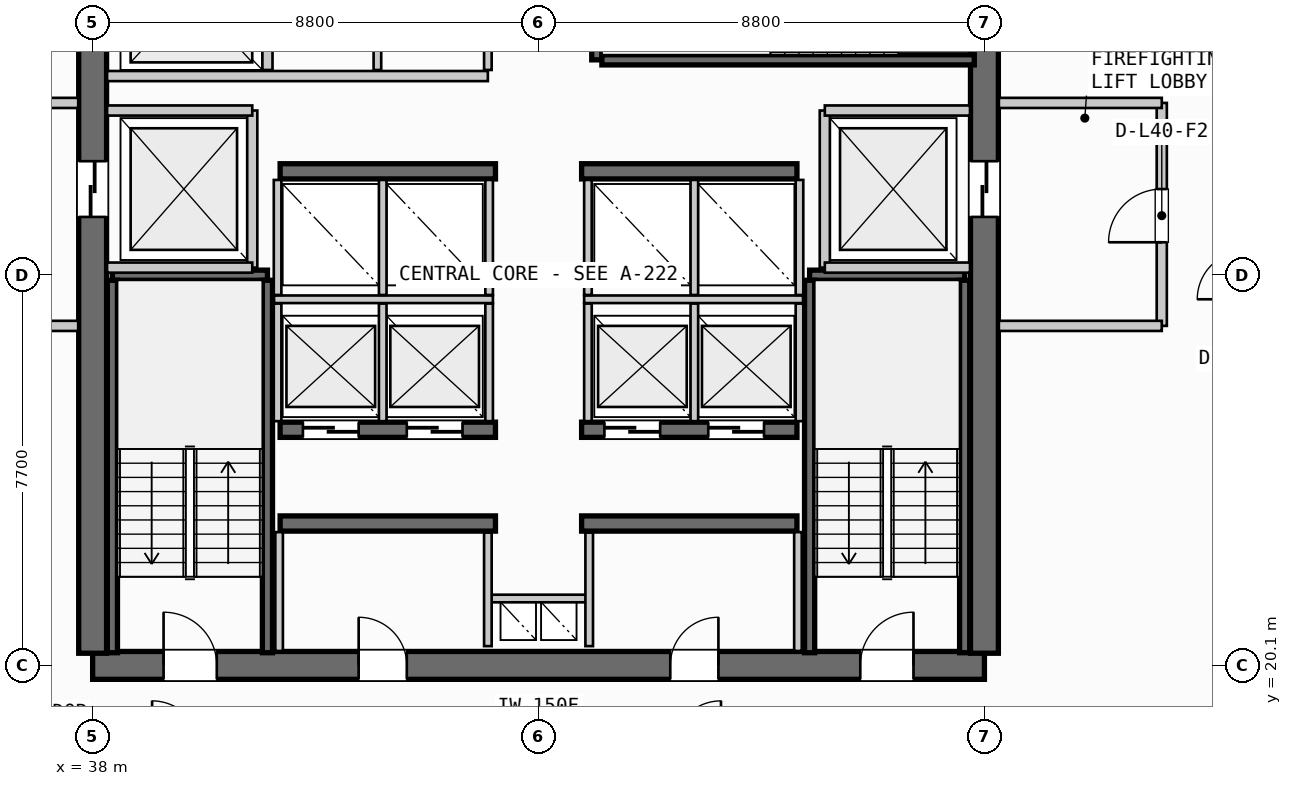
"""IFC4 building model, lengths in metres.
Left out: names, types, materials, properties, quantities, classifications, styles, units other than length and angle.
Written with IfcOpenShell. Run it as: python <this file> out.ifc"""

import sys

from ifc_helpers import new_model, si_unit, direction, frame, frame_2d, origin, place, context, subcontext, project, spatial, rectangle, extrude, source, transform, mapped, element, fill, save


model = new_model("IFC4")
c1 = context("Model", 3, precision=1e-05, world=origin(), true_north=direction((0.0, 1.0)))
c2 = subcontext(c1, "Body", "Model", "MODEL_VIEW")
j1 = project(units=[si_unit("LENGTHUNIT", "METRE"), si_unit("PLANEANGLEUNIT", "RADIAN")], contexts=[c1])
p1 = place(None, origin())
s1 = spatial("IfcSite", under=j1, at=p1, CompositionType="ELEMENT")
p2 = place(p1, origin())
s2 = spatial("IfcBuilding", under=s1, at=p2, CompositionType="ELEMENT")
p3 = place(p2, frame((0.0, 0.0, 157.2)))
s3 = spatial("IfcBuildingStorey", under=s2, at=p3, CompositionType="ELEMENT", Elevation=157.2)
p4 = place(p3, frame((38.0, 20.1, 0.0), z_axis=(0.0, 0.0, 1.0), x_axis=(1.0, 0.0, 0.0)))
e1 = element("IfcWall", 1, at=p4, inside=s3, PredefinedType="SHEAR", context=c2, shape_type="SweptSolid", body=[
    extrude(rectangle(XDim=17.6, YDim=0.55, at=frame_2d((8.8, 0.0))), origin(), (0.0, 0.0, 1.0), 3.3),
])
p5 = place(p4, frame((1.4, 0.0, 0.0)))
e2 = element("IfcOpeningElement", 2, at=p5, cuts=e1, PredefinedType="OPENING", context=c2, shape_type="SweptSolid", body=[
    extrude(rectangle(XDim=1.05, YDim=2.15, at=frame_2d((0.525, 1.075))), frame((0.0, 0.285, 0.0), z_axis=(0.0, -1.0, 0.0), x_axis=(1.0, 0.0, 0.0)), (0.0, 0.0, 1.0), 0.57),
])
p6 = place(p4, frame((15.15, 0.0, 0.0)))
e3 = element("IfcOpeningElement", 3, at=p6, cuts=e1, PredefinedType="OPENING", context=c2, shape_type="SweptSolid", body=[
    extrude(rectangle(XDim=1.05, YDim=2.15, at=frame_2d((0.525, 1.075))), frame((0.0, 0.285, 0.0), z_axis=(0.0, -1.0, 0.0), x_axis=(1.0, 0.0, 0.0)), (0.0, 0.0, 1.0), 0.57),
])
p7 = place(p4, frame((5.25, 0.0, 0.0)))
e4 = element("IfcOpeningElement", 4, at=p7, cuts=e1, PredefinedType="OPENING", context=c2, shape_type="SweptSolid", body=[
    extrude(rectangle(XDim=0.95, YDim=2.15, at=frame_2d((0.475, 1.075))), frame((0.0, 0.285, 0.0), z_axis=(0.0, -1.0, 0.0), x_axis=(1.0, 0.0, 0.0)), (0.0, 0.0, 1.0), 0.57),
])
p8 = place(p4, frame((11.4, 0.0, 0.0)))
e5 = element("IfcOpeningElement", 5, at=p8, cuts=e1, PredefinedType="OPENING", context=c2, shape_type="SweptSolid", body=[
    extrude(rectangle(XDim=0.95, YDim=2.15, at=frame_2d((0.475, 1.075))), frame((0.0, 0.285, 0.0), z_axis=(0.0, -1.0, 0.0), x_axis=(1.0, 0.0, 0.0)), (0.0, 0.0, 1.0), 0.57),
])
p9 = place(p3, frame((38.0, 35.26, 0.0), z_axis=(0.0, 0.0, 1.0), x_axis=(0.0, -1.0, 0.0)))
e6 = element("IfcWall", 6, at=p9, inside=s3, PredefinedType="SHEAR", context=c2, shape_type="SweptSolid", body=[
    extrude(rectangle(XDim=14.92, YDim=0.55, at=frame_2d((7.46, 0.0))), origin(), (0.0, 0.0, 1.0), 3.3),
])
p10 = place(p9, frame((5.21, 0.0, 0.0)))
e7 = element("IfcOpeningElement", 7, at=p10, cuts=e6, PredefinedType="OPENING", context=c2, shape_type="SweptSolid", body=[
    extrude(rectangle(XDim=1.1, YDim=2.2, at=frame_2d((0.55, 1.1))), frame((0.0, 0.285, 0.0), z_axis=(0.0, -1.0, 0.0), x_axis=(1.0, 0.0, 0.0)), (0.0, 0.0, 1.0), 0.57),
])
p11 = place(p3, frame((55.6, 20.34, 0.0), z_axis=(0.0, 0.0, 1.0), x_axis=(0.0, 1.0, 0.0)))
e8 = element("IfcWall", 8, at=p11, inside=s3, PredefinedType="SHEAR", context=c2, shape_type="SweptSolid", body=[
    extrude(rectangle(XDim=14.92, YDim=0.55, at=frame_2d((7.46, 0.0))), origin(), (0.0, 0.0, 1.0), 3.3),
])
p12 = place(p11, frame((12.71, 0.0, 0.0)))
e9 = element("IfcOpeningElement", 9, at=p12, cuts=e8, PredefinedType="OPENING", context=c2, shape_type="SweptSolid", body=[
    extrude(rectangle(XDim=1.05, YDim=2.15, at=frame_2d((0.525, 1.075))), frame((0.0, 0.285, 0.0), z_axis=(0.0, -1.0, 0.0), x_axis=(1.0, 0.0, 0.0)), (0.0, 0.0, 1.0), 0.57),
])
p13 = place(p11, frame((8.61, 0.0, 0.0)))
e10 = element("IfcOpeningElement", 10, at=p13, cuts=e8, PredefinedType="OPENING", context=c2, shape_type="SweptSolid", body=[
    extrude(rectangle(XDim=1.1, YDim=2.2, at=frame_2d((0.55, 1.1))), frame((0.0, 0.285, 0.0), z_axis=(0.0, -1.0, 0.0), x_axis=(1.0, 0.0, 0.0)), (0.0, 0.0, 1.0), 0.57),
])
for number, where, z_axis, x_axis in (
    (11, (41.7, 22.9, 0.0), (0.0, 0.0, 1.0), (1.0, 0.0, 0.0)),
    (12, (47.65, 22.9, 0.0), (0.0, 0.0, 1.0), (1.0, 0.0, 0.0)),
):
    element("IfcWall", number, at=place(p3, frame(where, z_axis=z_axis, x_axis=x_axis)), inside=s3, PredefinedType="SHEAR", context=c2, shape_type="SweptSolid", body=[
        extrude(rectangle(XDim=4.25, YDim=0.3, at=frame_2d((2.125, 0.0))), origin(), (0.0, 0.0, 1.0), 3.3),
    ])
p14 = place(p3, frame((41.7, 24.75, 0.0), z_axis=(0.0, 0.0, 1.0), x_axis=(1.0, 0.0, 0.0)))
e13 = element("IfcWall", 13, at=p14, inside=s3, PredefinedType="SHEAR", context=c2, shape_type="SweptSolid", body=[
    extrude(rectangle(XDim=4.25, YDim=0.3, at=frame_2d((2.125, 0.0))), origin(), (0.0, 0.0, 1.0), 3.3),
])
p15 = place(p14, frame((0.45, 0.0, 0.0)))
e14 = element("IfcOpeningElement", 14, at=p15, cuts=e13, PredefinedType="OPENING", context=c2, shape_type="SweptSolid", body=[
    extrude(rectangle(XDim=1.1, YDim=2.2, at=frame_2d((0.55, 1.1))), frame((0.0, 0.16, 0.0), z_axis=(0.0, -1.0, 0.0), x_axis=(1.0, 0.0, 0.0)), (0.0, 0.0, 1.0), 0.32),
])
p16 = place(p14, frame((2.5, 0.0, 0.0)))
e15 = element("IfcOpeningElement", 15, at=p16, cuts=e13, PredefinedType="OPENING", context=c2, shape_type="SweptSolid", body=[
    extrude(rectangle(XDim=1.1, YDim=2.2, at=frame_2d((0.55, 1.1))), frame((0.0, 0.16, 0.0), z_axis=(0.0, -1.0, 0.0), x_axis=(1.0, 0.0, 0.0)), (0.0, 0.0, 1.0), 0.32),
])
p17 = place(p3, frame((47.65, 24.75, 0.0), z_axis=(0.0, 0.0, 1.0), x_axis=(1.0, 0.0, 0.0)))
e16 = element("IfcWall", 16, at=p17, inside=s3, PredefinedType="SHEAR", context=c2, shape_type="SweptSolid", body=[
    extrude(rectangle(XDim=4.25, YDim=0.3, at=frame_2d((2.125, 0.0))), origin(), (0.0, 0.0, 1.0), 3.3),
])
p18 = place(p17, frame((0.45, 0.0, 0.0)))
e17 = element("IfcOpeningElement", 17, at=p18, cuts=e16, PredefinedType="OPENING", context=c2, shape_type="SweptSolid", body=[
    extrude(rectangle(XDim=1.1, YDim=2.2, at=frame_2d((0.55, 1.1))), frame((0.0, 0.16, 0.0), z_axis=(0.0, -1.0, 0.0), x_axis=(1.0, 0.0, 0.0)), (0.0, 0.0, 1.0), 0.32),
])
p19 = place(p17, frame((2.5, 0.0, 0.0)))
e18 = element("IfcOpeningElement", 18, at=p19, cuts=e16, PredefinedType="OPENING", context=c2, shape_type="SweptSolid", body=[
    extrude(rectangle(XDim=1.1, YDim=2.2, at=frame_2d((0.55, 1.1))), frame((0.0, 0.16, 0.0), z_axis=(0.0, -1.0, 0.0), x_axis=(1.0, 0.0, 0.0)), (0.0, 0.0, 1.0), 0.32),
])
for number, where, z_axis, x_axis in (
    (19, (41.7, 29.85, 0.0), (0.0, 0.0, 1.0), (1.0, 0.0, 0.0)),
    (20, (47.65, 29.85, 0.0), (0.0, 0.0, 1.0), (1.0, 0.0, 0.0)),
):
    element("IfcWall", number, at=place(p3, frame(where, z_axis=z_axis, x_axis=x_axis)), inside=s3, PredefinedType="SHEAR", context=c2, shape_type="SweptSolid", body=[
        extrude(rectangle(XDim=4.25, YDim=0.3, at=frame_2d((2.125, 0.0))), origin(), (0.0, 0.0, 1.0), 3.3),
    ])
p20 = place(p3, frame((38.39, 27.8, 0.0), z_axis=(0.0, 0.0, 1.0), x_axis=(1.0, 0.0, 0.0)))
e21 = element("IfcWall", 21, at=p20, inside=s3, PredefinedType="SHEAR", context=c2, shape_type="SweptSolid", body=[
    extrude(rectangle(XDim=3.06, YDim=0.2, at=frame_2d((1.53, 0.0))), origin(), (0.0, 0.0, 1.0), 3.3),
])
for number, where, z_axis, x_axis in (
    (22, (41.45, 27.7, 0.0), (0.0, 0.0, 1.0), (0.0, -1.0, 0.0)),
    (23, (38.39, 20.35, 0.0), (0.0, 0.0, 1.0), (0.0, 1.0, 0.0)),
):
    element("IfcWall", number, at=place(p3, frame(where, z_axis=z_axis, x_axis=x_axis)), inside=s3, PredefinedType="SHEAR", context=c2, shape_type="SweptSolid", body=[
        extrude(rectangle(XDim=7.35, YDim=0.2, at=frame_2d((3.675, 0.0))), origin(), (0.0, 0.0, 1.0), 3.3),
    ])
p21 = place(p3, frame((52.15, 27.8, 0.0), z_axis=(0.0, 0.0, 1.0), x_axis=(1.0, 0.0, 0.0)))
e24 = element("IfcWall", 24, at=p21, inside=s3, PredefinedType="SHEAR", context=c2, shape_type="SweptSolid", body=[
    extrude(rectangle(XDim=3.06, YDim=0.2, at=frame_2d((1.53, 0.0))), origin(), (0.0, 0.0, 1.0), 3.3),
])
for number, where, z_axis, x_axis in (
    (25, (55.21, 27.7, 0.0), (0.0, 0.0, 1.0), (0.0, -1.0, 0.0)),
    (26, (52.15, 20.35, 0.0), (0.0, 0.0, 1.0), (0.0, 1.0, 0.0)),
):
    element("IfcWall", number, at=place(p3, frame(where, z_axis=z_axis, x_axis=x_axis)), inside=s3, PredefinedType="SHEAR", context=c2, shape_type="SweptSolid", body=[
        extrude(rectangle(XDim=7.35, YDim=0.2, at=frame_2d((3.675, 0.0))), origin(), (0.0, 0.0, 1.0), 3.3),
    ])
p22 = place(p3, frame((47.95, 32.05, 0.0), z_axis=(0.0, 0.0, 1.0), x_axis=(0.0, 1.0, 0.0)))
e27 = element("IfcWall", 27, at=p22, inside=s3, PredefinedType="SHEAR", context=c2, shape_type="SweptSolid", body=[
    extrude(rectangle(XDim=3.06, YDim=0.2, at=frame_2d((1.53, 0.0))), origin(), (0.0, 0.0, 1.0), 3.3),
])
p23 = place(p3, frame((55.4, 32.05, 0.0), z_axis=(0.0, 0.0, 1.0), x_axis=(-1.0, 0.0, 0.0)))
e28 = element("IfcWall", 28, at=p23, inside=s3, PredefinedType="SHEAR", context=c2, shape_type="SweptSolid", body=[
    extrude(rectangle(XDim=7.35, YDim=0.2, at=frame_2d((3.675, 0.0))), origin(), (0.0, 0.0, 1.0), 3.3),
])
p24 = place(p3, frame((45.8, 21.42, 0.0), z_axis=(0.0, 0.0, 1.0), x_axis=(1.0, 0.0, 0.0)))
e29 = element("IfcWall", 29, at=p24, inside=s3, PredefinedType="PARTITIONING", context=c2, shape_type="SweptSolid", body=[
    extrude(rectangle(XDim=2.0, YDim=0.15, at=frame_2d((1.0, 0.0))), origin(), (0.0, 0.0, 1.0), 2.28),
])
for number, where, z_axis, x_axis in (
    (30, (45.8, 20.48, 0.0), (0.0, 0.0, 1.0), (0.0, 1.0, 0.0)),
    (31, (47.8, 20.48, 0.0), (0.0, 0.0, 1.0), (0.0, 1.0, 0.0)),
):
    element("IfcWall", number, at=place(p3, frame(where, z_axis=z_axis, x_axis=x_axis)), inside=s3, PredefinedType="PARTITIONING", context=c2, shape_type="SweptSolid", body=[
        extrude(rectangle(XDim=2.24, YDim=0.15, at=frame_2d((1.12, 0.0))), origin(), (0.0, 0.0, 1.0), 2.28),
    ])
p25 = place(p3, frame((41.15, 27.95, 0.0), z_axis=(0.0, 0.0, 1.0), x_axis=(0.0, 1.0, 0.0)))
e32 = element("IfcWall", 32, at=p25, inside=s3, PredefinedType="PARTITIONING", context=c2, shape_type="SweptSolid", body=[
    extrude(rectangle(XDim=3.1, YDim=0.2, at=frame_2d((1.55, 0.0))), origin(), (0.0, 0.0, 1.0), 2.28),
])
for number, where, z_axis, x_axis in (
    (33, (38.285, 27.95, 0.0), (0.0, 0.0, 1.0), (1.0, 0.0, 0.0)),
    (34, (38.285, 31.05, 0.0), (0.0, 0.0, 1.0), (1.0, 0.0, 0.0)),
):
    element("IfcWall", number, at=place(p3, frame(where, z_axis=z_axis, x_axis=x_axis)), inside=s3, PredefinedType="PARTITIONING", context=c2, shape_type="SweptSolid", body=[
        extrude(rectangle(XDim=2.865, YDim=0.2, at=frame_2d((1.433, 0.0))), origin(), (0.0, 0.0, 1.0), 2.28),
    ])
for number, where, z_axis, x_axis in (
    (35, (34.5, 26.8, 0.0), (0.0, 0.0, 1.0), (1.0, 0.0, 0.0)),
    (36, (34.5, 31.2, 0.0), (0.0, 0.0, 1.0), (1.0, 0.0, 0.0)),
):
    element("IfcWall", number, at=place(p3, frame(where, z_axis=z_axis, x_axis=x_axis)), inside=s3, PredefinedType="PARTITIONING", context=c2, shape_type="SweptSolid", body=[
        extrude(rectangle(XDim=3.215, YDim=0.2, at=frame_2d((1.607, 0.0))), origin(), (0.0, 0.0, 1.0), 2.28),
    ])
p26 = place(p3, frame((52.45, 27.95, 0.0), z_axis=(0.0, 0.0, 1.0), x_axis=(0.0, 1.0, 0.0)))
e37 = element("IfcWall", 37, at=p26, inside=s3, PredefinedType="PARTITIONING", context=c2, shape_type="SweptSolid", body=[
    extrude(rectangle(XDim=3.1, YDim=0.2, at=frame_2d((1.55, 0.0))), origin(), (0.0, 0.0, 1.0), 2.28),
])
for number, where, z_axis, x_axis in (
    (38, (52.45, 27.95, 0.0), (0.0, 0.0, 1.0), (1.0, 0.0, 0.0)),
    (39, (52.45, 31.05, 0.0), (0.0, 0.0, 1.0), (1.0, 0.0, 0.0)),
):
    element("IfcWall", number, at=place(p3, frame(where, z_axis=z_axis, x_axis=x_axis)), inside=s3, PredefinedType="PARTITIONING", context=c2, shape_type="SweptSolid", body=[
        extrude(rectangle(XDim=2.865, YDim=0.2, at=frame_2d((1.433, 0.0))), origin(), (0.0, 0.0, 1.0), 2.28),
    ])
p27 = place(p3, frame((59.1, 26.8, 0.0), z_axis=(0.0, 0.0, 1.0), x_axis=(0.0, 1.0, 0.0)))
e40 = element("IfcWall", 40, at=p27, inside=s3, PredefinedType="PARTITIONING", context=c2, shape_type="SweptSolid", body=[
    extrude(rectangle(XDim=4.4, YDim=0.2, at=frame_2d((2.2, 0.0))), origin(), (0.0, 0.0, 1.0), 2.28),
])
p28 = place(p27, frame((1.65, 0.0, 0.0)))
e41 = element("IfcOpeningElement", 41, at=p28, cuts=e40, PredefinedType="OPENING", context=c2, shape_type="SweptSolid", body=[
    extrude(rectangle(XDim=1.05, YDim=2.15, at=frame_2d((0.525, 1.075))), frame((0.0, 0.11, 0.0), z_axis=(0.0, -1.0, 0.0), x_axis=(1.0, 0.0, 0.0)), (0.0, 0.0, 1.0), 0.22),
])
for number, where, z_axis, x_axis in (
    (42, (55.885, 26.8, 0.0), (0.0, 0.0, 1.0), (1.0, 0.0, 0.0)),
    (43, (55.885, 31.2, 0.0), (0.0, 0.0, 1.0), (1.0, 0.0, 0.0)),
):
    element("IfcWall", number, at=place(p3, frame(where, z_axis=z_axis, x_axis=x_axis)), inside=s3, PredefinedType="PARTITIONING", context=c2, shape_type="SweptSolid", body=[
        extrude(rectangle(XDim=3.215, YDim=0.2, at=frame_2d((1.607, 0.0))), origin(), (0.0, 0.0, 1.0), 2.28),
    ])
for number, where, z_axis, x_axis in (
    (44, (41.68, 20.385, 0.0), (0.0, 0.0, 1.0), (0.0, 1.0, 0.0)),
    (45, (51.92, 20.385, 0.0), (0.0, 0.0, 1.0), (0.0, 1.0, 0.0)),
):
    element("IfcWall", number, at=place(p3, frame(where, z_axis=z_axis, x_axis=x_axis)), inside=s3, PredefinedType="PARTITIONING", context=c2, shape_type="SweptSolid", body=[
        extrude(rectangle(XDim=2.345, YDim=0.15, at=frame_2d((1.172, 0.0))), origin(), (0.0, 0.0, 1.0), 2.28),
    ])
p29 = place(p3, frame((41.58, 27.325, 0.0), z_axis=(0.0, 0.0, 1.0), x_axis=(1.0, 0.0, 0.0)))
e46 = element("IfcWall", 46, at=p29, inside=s3, PredefinedType="PARTITIONING", context=c2, shape_type="SweptSolid", body=[
    extrude(rectangle(XDim=4.32, YDim=0.15, at=frame_2d((2.16, 0.0))), origin(), (0.0, 0.0, 1.0), 2.28),
])
p30 = place(p3, frame((47.7, 27.325, 0.0), z_axis=(0.0, 0.0, 1.0), x_axis=(1.0, 0.0, 0.0)))
e47 = element("IfcWall", 47, at=p30, inside=s3, PredefinedType="PARTITIONING", context=c2, shape_type="SweptSolid", body=[
    extrude(rectangle(XDim=4.32, YDim=0.15, at=frame_2d((2.16, 0.0))), origin(), (0.0, 0.0, 1.0), 2.28),
])
for number, where, z_axis, x_axis in (
    (48, (41.65, 24.92, 0.0), (0.0, 0.0, 1.0), (0.0, 1.0, 0.0)),
    (49, (43.725, 24.92, 0.0), (0.0, 0.0, 1.0), (0.0, 1.0, 0.0)),
    (50, (45.825, 24.92, 0.0), (0.0, 0.0, 1.0), (0.0, 1.0, 0.0)),
    (51, (47.775, 24.92, 0.0), (0.0, 0.0, 1.0), (0.0, 1.0, 0.0)),
    (52, (49.875, 24.92, 0.0), (0.0, 0.0, 1.0), (0.0, 1.0, 0.0)),
    (53, (51.95, 24.92, 0.0), (0.0, 0.0, 1.0), (0.0, 1.0, 0.0)),
):
    element("IfcWall", number, at=place(p3, frame(where, z_axis=z_axis, x_axis=x_axis)), inside=s3, PredefinedType="PARTITIONING", context=c2, shape_type="SweptSolid", body=[
        extrude(rectangle(XDim=2.32, YDim=0.15, at=frame_2d((1.16, 0.0))), origin(), (0.0, 0.0, 1.0), 2.28),
    ])
for number, where, z_axis, x_axis in (
    (54, (41.65, 27.41, 0.0), (0.0, 0.0, 1.0), (0.0, 1.0, 0.0)),
    (55, (43.725, 27.41, 0.0), (0.0, 0.0, 1.0), (0.0, 1.0, 0.0)),
    (56, (45.825, 27.41, 0.0), (0.0, 0.0, 1.0), (0.0, 1.0, 0.0)),
    (57, (47.775, 27.41, 0.0), (0.0, 0.0, 1.0), (0.0, 1.0, 0.0)),
    (58, (49.875, 27.41, 0.0), (0.0, 0.0, 1.0), (0.0, 1.0, 0.0)),
    (59, (51.95, 27.41, 0.0), (0.0, 0.0, 1.0), (0.0, 1.0, 0.0)),
):
    element("IfcWall", number, at=place(p3, frame(where, z_axis=z_axis, x_axis=x_axis)), inside=s3, PredefinedType="PARTITIONING", context=c2, shape_type="SweptSolid", body=[
        extrude(rectangle(XDim=2.27, YDim=0.15, at=frame_2d((1.135, 0.0))), origin(), (0.0, 0.0, 1.0), 2.28),
    ])
p31 = place(p3, frame((41.45, 31.85, 0.0), z_axis=(0.0, 0.0, 1.0), x_axis=(0.0, 1.0, 0.0)))
e60 = element("IfcWall", 60, at=p31, inside=s3, PredefinedType="PARTITIONING", context=c2, shape_type="SweptSolid", body=[
    extrude(rectangle(XDim=3.365, YDim=0.2, at=frame_2d((1.683, 0.0))), origin(), (0.0, 0.0, 1.0), 2.28),
])
p32 = place(p3, frame((38.285, 31.73, 0.0), z_axis=(0.0, 0.0, 1.0), x_axis=(1.0, 0.0, 0.0)))
e61 = element("IfcWall", 61, at=p32, inside=s3, PredefinedType="PARTITIONING", context=c2, shape_type="SweptSolid", body=[
    extrude(rectangle(XDim=7.515, YDim=0.2, at=frame_2d((3.758, 0.0))), origin(), (0.0, 0.0, 1.0), 2.28),
])
p33 = place(p3, frame((45.8, 31.85, 0.0), z_axis=(0.0, 0.0, 1.0), x_axis=(0.0, 1.0, 0.0)))
e62 = element("IfcWall", 62, at=p33, inside=s3, PredefinedType="PARTITIONING", context=c2, shape_type="SweptSolid", body=[
    extrude(rectangle(XDim=3.365, YDim=0.15, at=frame_2d((1.683, 0.0))), origin(), (0.0, 0.0, 1.0), 2.28),
])
p34 = place(p3, frame((43.62, 31.85, 0.0), z_axis=(0.0, 0.0, 1.0), x_axis=(0.0, 1.0, 0.0)))
e63 = element("IfcWall", 63, at=p34, inside=s3, PredefinedType="PLUMBINGWALL", context=c2, shape_type="SweptSolid", body=[
    extrude(rectangle(XDim=3.365, YDim=0.15, at=frame_2d((1.683, 0.0))), origin(), (0.0, 0.0, 1.0), 2.28),
])
m1 = source(origin(), c2, "Body", "SweptSolid", [
    extrude(rectangle(XDim=1.05, YDim=2.15, at=frame_2d((0.525, 1.075))), frame((0.0, 0.025, 0.0), z_axis=(0.0, -1.0, 0.0), x_axis=(1.0, 0.0, 0.0)), (0.0, 0.0, 1.0), 0.05),
])
p35 = place(p5, origin())
e64 = element("IfcDoor", 64, at=p35, inside=s3, OperationType="SINGLE_SWING_LEFT", PredefinedType="DOOR", context=c2, shape_type="MappedRepresentation", body=[
    mapped(m1, transform((0.0, 0.0, 0.0), scale=1.0)),
])
fill(e2, e64)
p36 = place(p6, origin())
e65 = element("IfcDoor", 65, at=p36, inside=s3, OperationType="SINGLE_SWING_RIGHT", PredefinedType="DOOR", context=c2, shape_type="MappedRepresentation", body=[
    mapped(m1, transform((0.0, 0.0, 0.0), scale=1.0)),
])
fill(e3, e65)
m2 = source(origin(), c2, "Body", "SweptSolid", [
    extrude(rectangle(XDim=1.1, YDim=2.2, at=frame_2d((0.55, 1.1))), frame((0.0, 0.025, 0.0), z_axis=(0.0, -1.0, 0.0), x_axis=(1.0, 0.0, 0.0)), (0.0, 0.0, 1.0), 0.05),
])
p37 = place(p10, origin())
e66 = element("IfcDoor", 66, at=p37, inside=s3, OperationType="SLIDING_TO_LEFT", PredefinedType="DOOR", context=c2, shape_type="MappedRepresentation", body=[
    mapped(m2, transform((0.0, 0.0, 0.0), scale=1.0)),
])
fill(e7, e66)
p38 = place(p13, origin())
e67 = element("IfcDoor", 67, at=p38, inside=s3, OperationType="SLIDING_TO_RIGHT", PredefinedType="DOOR", context=c2, shape_type="MappedRepresentation", body=[
    mapped(m2, transform((0.0, 0.0, 0.0), scale=1.0)),
])
fill(e10, e67)
m3 = source(origin(), c2, "Body", "SweptSolid", [
    extrude(rectangle(XDim=0.95, YDim=2.15, at=frame_2d((0.475, 1.075))), frame((0.0, 0.025, 0.0), z_axis=(0.0, -1.0, 0.0), x_axis=(1.0, 0.0, 0.0)), (0.0, 0.0, 1.0), 0.05),
])
p39 = place(p7, origin())
e68 = element("IfcDoor", 68, at=p39, inside=s3, OperationType="SINGLE_SWING_LEFT", PredefinedType="DOOR", context=c2, shape_type="MappedRepresentation", body=[
    mapped(m3, transform((0.0, 0.0, 0.0), scale=1.0)),
])
fill(e4, e68)
p40 = place(p8, origin())
e69 = element("IfcDoor", 69, at=p40, inside=s3, OperationType="SINGLE_SWING_RIGHT", PredefinedType="DOOR", context=c2, shape_type="MappedRepresentation", body=[
    mapped(m3, transform((0.0, 0.0, 0.0), scale=1.0)),
])
fill(e5, e69)
p41 = place(p15, origin())
e70 = element("IfcDoor", 70, at=p41, inside=s3, OperationType="SLIDING_TO_RIGHT", PredefinedType="DOOR", context=c2, shape_type="MappedRepresentation", body=[
    mapped(m2, transform((0.0, 0.0, 0.0), scale=1.0)),
])
fill(e14, e70)
p42 = place(p16, origin())
e71 = element("IfcDoor", 71, at=p42, inside=s3, OperationType="SLIDING_TO_RIGHT", PredefinedType="DOOR", context=c2, shape_type="MappedRepresentation", body=[
    mapped(m2, transform((0.0, 0.0, 0.0), scale=1.0)),
])
fill(e15, e71)
p43 = place(p18, origin())
e72 = element("IfcDoor", 72, at=p43, inside=s3, OperationType="SLIDING_TO_RIGHT", PredefinedType="DOOR", context=c2, shape_type="MappedRepresentation", body=[
    mapped(m2, transform((0.0, 0.0, 0.0), scale=1.0)),
])
fill(e17, e72)
p44 = place(p19, origin())
e73 = element("IfcDoor", 73, at=p44, inside=s3, OperationType="SLIDING_TO_RIGHT", PredefinedType="DOOR", context=c2, shape_type="MappedRepresentation", body=[
    mapped(m2, transform((0.0, 0.0, 0.0), scale=1.0)),
])
fill(e18, e73)
p45 = place(p28, origin())
e74 = element("IfcDoor", 74, at=p45, inside=s3, OperationType="SINGLE_SWING_LEFT", PredefinedType="DOOR", context=c2, shape_type="MappedRepresentation", body=[
    mapped(m1, transform((0.0, 0.0, 0.0), scale=1.0)),
])
fill(e41, e74)
save(model, sys.argv[1])
